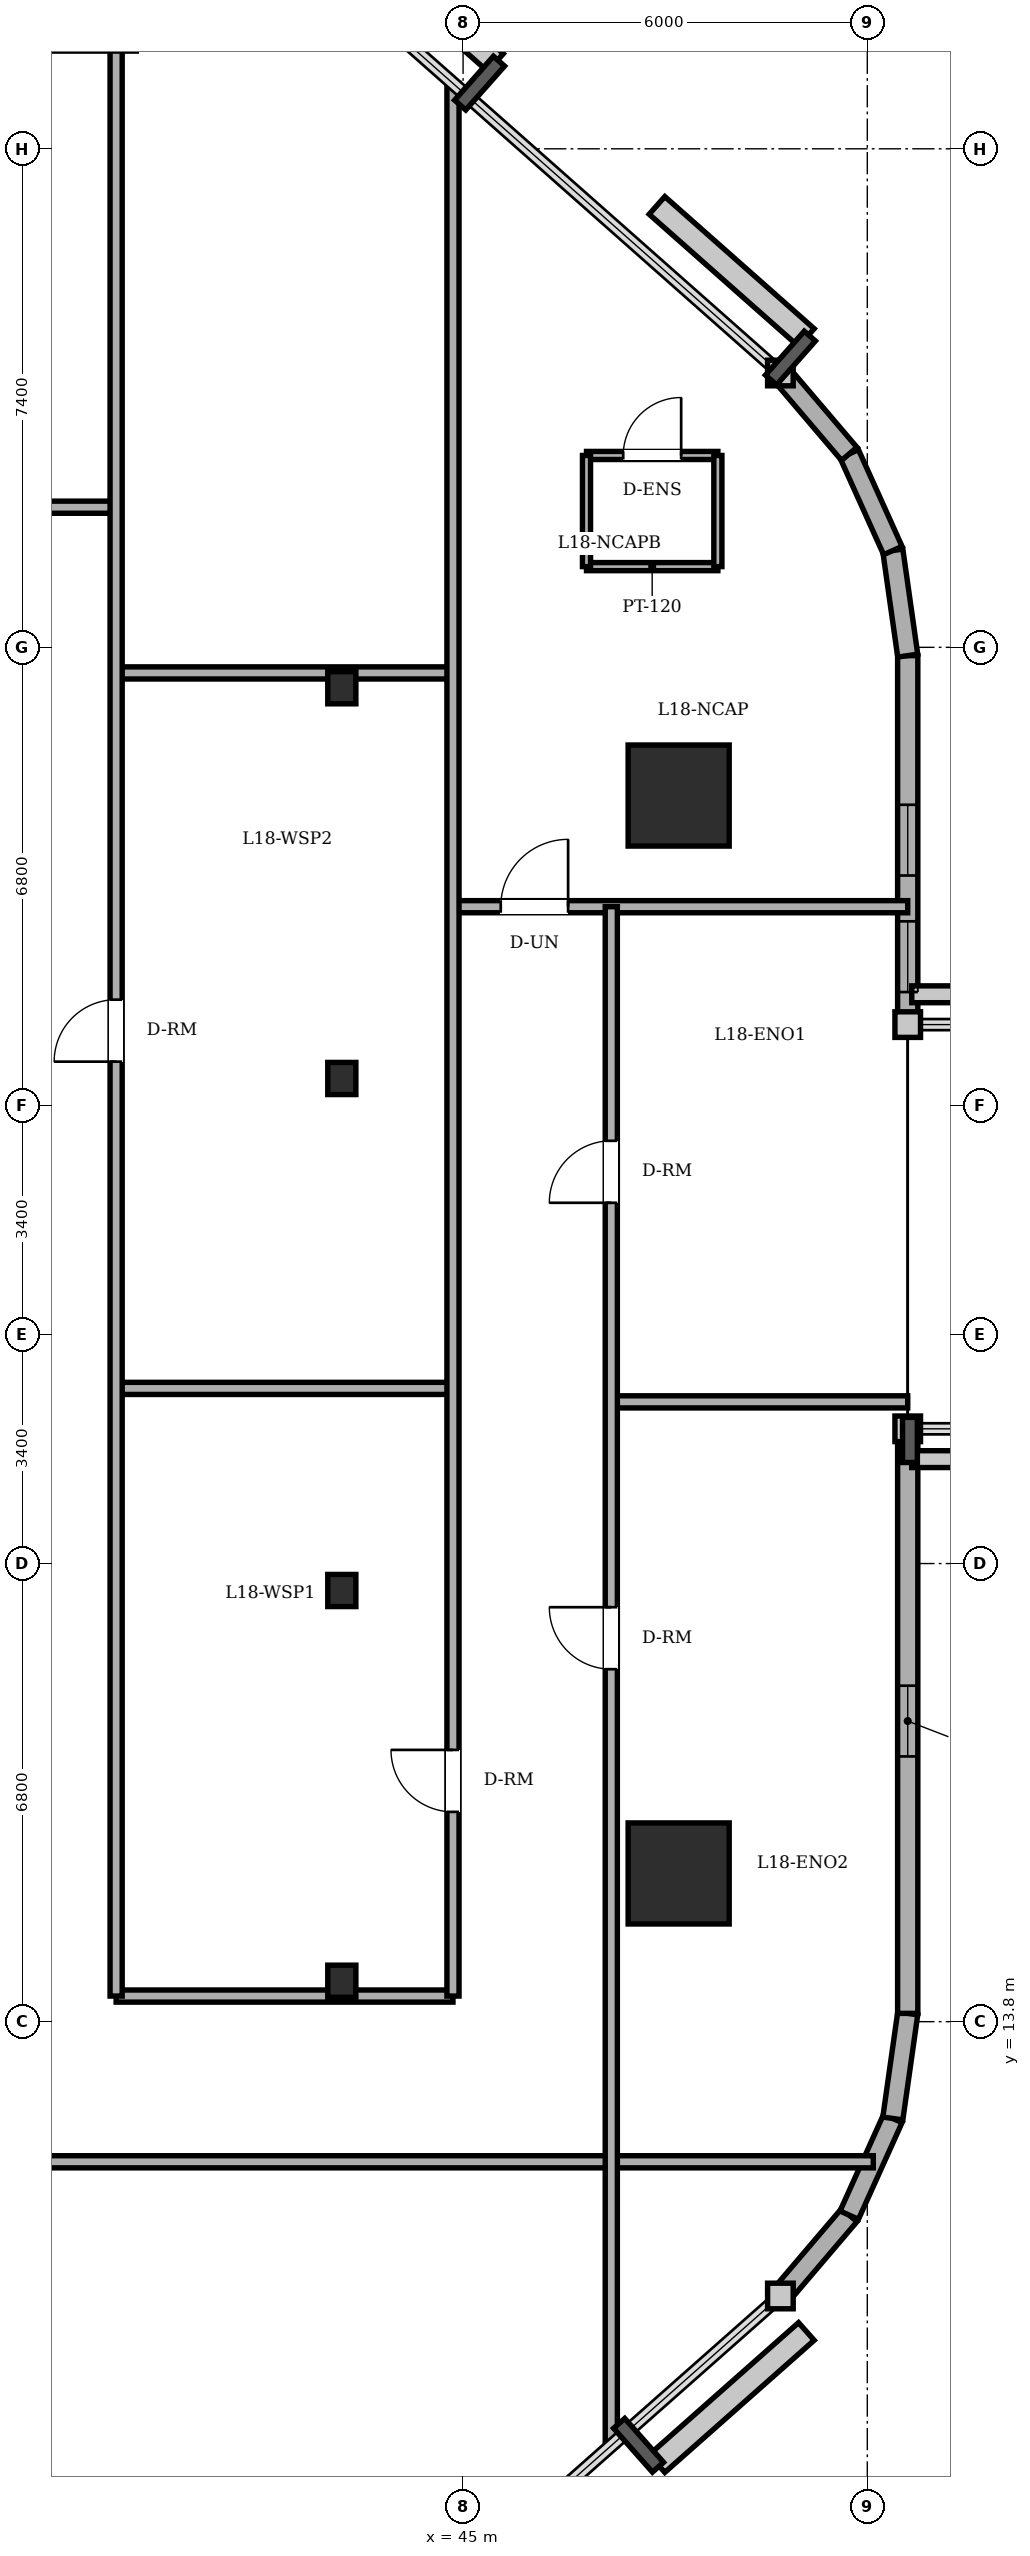
"""IFC4 building model, lengths in metres.
Left out: names, types, materials, properties, quantities, classifications, styles, units other than length and angle.
Written with IfcOpenShell. Run it as: python <this file> out.ifc"""

import sys

from ifc_helpers import new_model, si_unit, direction, frame, frame_2d, origin, origin_2d, place, context, subcontext, project, spatial, rectangle, circle, i_section, extrude, element, fill, save


model = new_model("IFC4")
c1 = context("Model", 3, precision=1e-05, world=origin(), true_north=direction((0.0, 1.0)))
c2 = subcontext(c1, "Body", "Model", "MODEL_VIEW")
j1 = project(units=[si_unit("LENGTHUNIT", "METRE"), si_unit("PLANEANGLEUNIT", "RADIAN")], contexts=[c1])
p1 = place(None, origin())
s1 = spatial("IfcSite", under=j1, at=p1, CompositionType="ELEMENT")
p2 = place(p1, origin())
s2 = spatial("IfcBuilding", under=s1, at=p2, CompositionType="ELEMENT")
p3 = place(p2, frame((0.0, 0.0, 68.4)))
s3 = spatial("IfcBuildingStorey", under=s2, at=p3, CompositionType="ELEMENT", Elevation=68.4)
for number, where, z_axis, x_axis in (
    (1, (48.2, 16.0, 0.0), (0.0, 0.0, 1.0), (1.0, 0.0, 0.0)),
    (2, (48.2, 32.0, 0.0), (0.0, 0.0, 1.0), (1.0, 0.0, 0.0)),
):
    element("IfcColumn", number, at=place(p3, frame(where, z_axis=z_axis, x_axis=x_axis)), inside=s3, PredefinedType="COLUMN", context=c2, shape_type="SweptSolid", body=[
        extrude(circle(Radius=0.75, at=origin_2d()), origin(), (0.0, 0.0, 1.0), 3.6),
    ])
for number, where, z_axis, x_axis in (
    (3, (43.2, 14.4, 0.0), (0.0, 0.0, 1.0), (1.0, 0.0, 0.0)),
    (4, (43.2, 20.2, 0.0), (0.0, 0.0, 1.0), (1.0, 0.0, 0.0)),
    (5, (43.2, 27.8, 0.0), (0.0, 0.0, 1.0), (1.0, 0.0, 0.0)),
    (6, (43.2, 33.6, 0.0), (0.0, 0.0, 1.0), (1.0, 0.0, 0.0)),
):
    element("IfcColumn", number, at=place(p3, frame(where, z_axis=z_axis, x_axis=x_axis)), inside=s3, PredefinedType="COLUMN", context=c2, shape_type="SweptSolid", body=[
        extrude(i_section(OverallWidth=0.417, OverallDepth=0.477, WebThickness=0.036, FlangeThickness=0.057, FilletRadius=0.015, at=origin_2d()), origin(), (0.0, 0.0, 1.0), 3.6),
    ])
p4 = place(p3, frame((49.71, 9.728, 0.0), z_axis=(0.0, 0.0, 1.0), x_axis=(0.648389989909, 0.7613083613, 0.0)))
e7 = element("IfcWall", 7, at=p4, inside=s3, PredefinedType="SOLIDWALL", context=c2, shape_type="SweptSolid", body=[
    extrude(rectangle(XDim=1.576, YDim=0.3, at=frame_2d((0.788, 0.0))), origin(), (0.0, 0.0, 1.0), 3.4),
])
p5 = place(p3, frame((50.732, 10.928, 0.0), z_axis=(0.0, 0.0, 1.0), x_axis=(0.410996558744, 0.911636895206, 0.0)))
e8 = element("IfcWall", 8, at=p5, inside=s3, PredefinedType="SOLIDWALL", context=c2, shape_type="SweptSolid", body=[
    extrude(rectangle(XDim=1.574, YDim=0.3, at=frame_2d((0.787, 0.0))), origin(), (0.0, 0.0, 1.0), 3.4),
])
p6 = place(p3, frame((51.379, 12.363, 0.0), z_axis=(0.0, 0.0, 1.0), x_axis=(0.140380048512, 0.990097693149, 0.0)))
e9 = element("IfcWall", 9, at=p6, inside=s3, PredefinedType="SOLIDWALL", context=c2, shape_type="SweptSolid", body=[
    extrude(rectangle(XDim=1.576, YDim=0.3, at=frame_2d((0.788, 0.0))), origin(), (0.0, 0.0, 1.0), 3.4),
])
p7 = place(p3, frame((51.6, 13.923, 0.0), z_axis=(0.0, 0.0, 1.0), x_axis=(0.0, 1.0, 0.0)))
e10 = element("IfcWall", 10, at=p7, inside=s3, PredefinedType="SOLIDWALL", context=c2, shape_type="SweptSolid", body=[
    extrude(rectangle(XDim=8.677, YDim=0.3, at=frame_2d((4.338, 0.0))), origin(), (0.0, 0.0, 1.0), 3.4),
])
p8 = place(p7, frame((3.814, 0.0, 0.85)))
e11 = element("IfcOpeningElement", 11, at=p8, cuts=e10, PredefinedType="OPENING", context=c2, shape_type="SweptSolid", body=[
    extrude(rectangle(XDim=1.05, YDim=1.55, at=frame_2d((0.525, 0.775))), frame((0.0, 0.16, 0.0), z_axis=(0.0, -1.0, 0.0), x_axis=(1.0, 0.0, 0.0)), (0.0, 0.0, 1.0), 0.32),
])
p9 = place(p3, frame((51.6, 28.6, 0.0), z_axis=(0.0, 0.0, 1.0), x_axis=(0.0, 1.0, 0.0)))
e12 = element("IfcWall", 12, at=p9, inside=s3, PredefinedType="SOLIDWALL", context=c2, shape_type="SweptSolid", body=[
    extrude(rectangle(XDim=5.477, YDim=0.3, at=frame_2d((2.738, 0.0))), origin(), (0.0, 0.0, 1.0), 3.4),
])
p10 = place(p9, frame((2.213, 0.0, 0.85)))
e13 = element("IfcOpeningElement", 13, at=p10, cuts=e12, PredefinedType="OPENING", context=c2, shape_type="SweptSolid", body=[
    extrude(rectangle(XDim=1.05, YDim=1.55, at=frame_2d((0.525, 0.775))), frame((0.0, 0.16, 0.0), z_axis=(0.0, -1.0, 0.0), x_axis=(1.0, 0.0, 0.0)), (0.0, 0.0, 1.0), 0.32),
])
p11 = place(p9, frame((0.483, 0.0, 0.85)))
e14 = element("IfcOpeningElement", 14, at=p11, cuts=e12, PredefinedType="OPENING", context=c2, shape_type="SweptSolid", body=[
    extrude(rectangle(XDim=1.05, YDim=1.55, at=frame_2d((0.525, 0.775))), frame((0.0, 0.16, 0.0), z_axis=(0.0, -1.0, 0.0), x_axis=(1.0, 0.0, 0.0)), (0.0, 0.0, 1.0), 0.32),
])
p12 = place(p3, frame((51.6, 34.077, 0.0), z_axis=(0.0, 0.0, 1.0), x_axis=(-0.140380048512, 0.990097693149, 0.0)))
e15 = element("IfcWall", 15, at=p12, inside=s3, PredefinedType="SOLIDWALL", context=c2, shape_type="SweptSolid", body=[
    extrude(rectangle(XDim=1.576, YDim=0.3, at=frame_2d((0.788, 0.0))), origin(), (0.0, 0.0, 1.0), 3.4),
])
p13 = place(p3, frame((51.379, 35.637, 0.0), z_axis=(0.0, 0.0, 1.0), x_axis=(-0.410996558744, 0.911636895206, 0.0)))
e16 = element("IfcWall", 16, at=p13, inside=s3, PredefinedType="SOLIDWALL", context=c2, shape_type="SweptSolid", body=[
    extrude(rectangle(XDim=1.574, YDim=0.3, at=frame_2d((0.787, 0.0))), origin(), (0.0, 0.0, 1.0), 3.4),
])
p14 = place(p3, frame((50.732, 37.072, 0.0), z_axis=(0.0, 0.0, 1.0), x_axis=(-0.648389989909, 0.7613083613, 0.0)))
e17 = element("IfcWall", 17, at=p14, inside=s3, PredefinedType="SOLIDWALL", context=c2, shape_type="SweptSolid", body=[
    extrude(rectangle(XDim=1.576, YDim=0.3, at=frame_2d((0.788, 0.0))), origin(), (0.0, 0.0, 1.0), 3.4),
])
p15 = place(p3, frame((46.832, 37.048, 0.0), z_axis=(0.0, 0.0, 1.0), x_axis=(1.0, 0.0, 0.0)))
e18 = element("IfcWall", 18, at=p15, inside=s3, PredefinedType="PARTITIONING", context=c2, shape_type="SweptSolid", body=[
    extrude(rectangle(XDim=1.95, YDim=0.12, at=frame_2d((0.975, 0.0))), origin(), (0.0, 0.0, 1.0), 3.4),
])
p16 = place(p15, frame((0.545, 0.0, 0.0)))
e19 = element("IfcOpeningElement", 19, at=p16, cuts=e18, PredefinedType="OPENING", context=c2, shape_type="SweptSolid", body=[
    extrude(rectangle(XDim=0.86, YDim=2.1, at=frame_2d((0.43, 1.05))), frame((0.0, 0.07, 0.0), z_axis=(0.0, -1.0, 0.0), x_axis=(1.0, 0.0, 0.0)), (0.0, 0.0, 1.0), 0.14),
])
p17 = place(p3, frame((48.782, 35.398, 0.0), z_axis=(0.0, 0.0, 1.0), x_axis=(-1.0, 0.0, 0.0)))
e20 = element("IfcWall", 20, at=p17, inside=s3, PredefinedType="PARTITIONING", context=c2, shape_type="SweptSolid", body=[
    extrude(rectangle(XDim=1.95, YDim=0.12, at=frame_2d((0.975, 0.0))), origin(), (0.0, 0.0, 1.0), 3.4),
])
for number, where, z_axis, x_axis in (
    (21, (46.832, 37.048, 0.0), (0.0, 0.0, 1.0), (0.0, -1.0, 0.0)),
    (22, (48.782, 35.398, 0.0), (0.0, 0.0, 1.0), (0.0, 1.0, 0.0)),
):
    element("IfcWall", number, at=place(p3, frame(where, z_axis=z_axis, x_axis=x_axis)), inside=s3, PredefinedType="PARTITIONING", context=c2, shape_type="SweptSolid", body=[
        extrude(rectangle(XDim=1.65, YDim=0.12, at=frame_2d((0.825, 0.0))), origin(), (0.0, 0.0, 1.0), 3.4),
    ])
p18 = place(p3, frame((3.4, 11.72, 0.0), z_axis=(0.0, 0.0, 1.0), x_axis=(1.0, 0.0, 0.0)))
e23 = element("IfcWall", 23, at=p18, inside=s3, PredefinedType="PARTITIONING", context=c2, shape_type="SweptSolid", body=[
    extrude(rectangle(XDim=47.689, YDim=0.18, at=frame_2d((23.845, 0.0))), origin(), (0.0, 0.0, 1.0), 3.4),
])
p19 = place(p18, frame((21.24, 0.0, 0.0)))
e24 = element("IfcOpeningElement", 24, at=p19, cuts=e23, PredefinedType="OPENING", context=c2, shape_type="SweptSolid", body=[
    extrude(rectangle(XDim=0.92, YDim=2.1, at=frame_2d((0.46, 1.05))), frame((0.0, 0.1, 0.0), z_axis=(0.0, -1.0, 0.0), x_axis=(1.0, 0.0, 0.0)), (0.0, 0.0, 1.0), 0.2),
])
p20 = place(p18, frame((10.74, 0.0, 0.0)))
e25 = element("IfcOpeningElement", 25, at=p20, cuts=e23, PredefinedType="OPENING", context=c2, shape_type="SweptSolid", body=[
    extrude(rectangle(XDim=0.92, YDim=2.1, at=frame_2d((0.46, 1.05))), frame((0.0, 0.1, 0.0), z_axis=(0.0, -1.0, 0.0), x_axis=(1.0, 0.0, 0.0)), (0.0, 0.0, 1.0), 0.2),
])
p21 = place(p18, frame((33.2, 0.0, 0.0)))
e26 = element("IfcOpeningElement", 26, at=p21, cuts=e23, PredefinedType="OPENING", context=c2, shape_type="SweptSolid", body=[
    extrude(rectangle(XDim=1.0, YDim=2.15, at=frame_2d((0.5, 1.075))), frame((0.0, 0.1, 0.0), z_axis=(0.0, -1.0, 0.0), x_axis=(1.0, 0.0, 0.0)), (0.0, 0.0, 1.0), 0.2),
])
p22 = place(p3, frame((39.85, 14.18, 0.0), z_axis=(0.0, 0.0, 1.0), x_axis=(1.0, 0.0, 0.0)))
e27 = element("IfcWall", 27, at=p22, inside=s3, PredefinedType="PARTITIONING", context=c2, shape_type="SweptSolid", body=[
    extrude(rectangle(XDim=5.0, YDim=0.18, at=frame_2d((2.5, 0.0))), origin(), (0.0, 0.0, 1.0), 2.782),
])
p23 = place(p3, frame((47.2, 23.0, 0.0), z_axis=(0.0, 0.0, 1.0), x_axis=(1.0, 0.0, 0.0)))
e28 = element("IfcWall", 28, at=p23, inside=s3, PredefinedType="PARTITIONING", context=c2, shape_type="SweptSolid", body=[
    extrude(rectangle(XDim=4.4, YDim=0.18, at=frame_2d((2.2, 0.0))), origin(), (0.0, 0.0, 1.0), 3.4),
])
p24 = place(p3, frame((39.85, 23.2, 0.0), z_axis=(0.0, 0.0, 1.0), x_axis=(1.0, 0.0, 0.0)))
e29 = element("IfcWall", 29, at=p24, inside=s3, PredefinedType="PARTITIONING", context=c2, shape_type="SweptSolid", body=[
    extrude(rectangle(XDim=5.0, YDim=0.18, at=frame_2d((2.5, 0.0))), origin(), (0.0, 0.0, 1.0), 3.4),
])
p25 = place(p3, frame((44.85, 30.35, 0.0), z_axis=(0.0, 0.0, 1.0), x_axis=(1.0, 0.0, 0.0)))
e30 = element("IfcWall", 30, at=p25, inside=s3, PredefinedType="PARTITIONING", context=c2, shape_type="SweptSolid", body=[
    extrude(rectangle(XDim=6.75, YDim=0.18, at=frame_2d((3.375, 0.0))), origin(), (0.0, 0.0, 1.0), 3.4),
])
p26 = place(p25, frame((0.709, 0.0, 0.0)))
e31 = element("IfcOpeningElement", 31, at=p26, cuts=e30, PredefinedType="OPENING", context=c2, shape_type="SweptSolid", body=[
    extrude(rectangle(XDim=1.0, YDim=2.15, at=frame_2d((0.5, 1.075))), frame((0.0, 0.1, 0.0), z_axis=(0.0, -1.0, 0.0), x_axis=(1.0, 0.0, 0.0)), (0.0, 0.0, 1.0), 0.2),
])
p27 = place(p3, frame((39.85, 33.82, 0.0), z_axis=(0.0, 0.0, 1.0), x_axis=(1.0, 0.0, 0.0)))
e32 = element("IfcWall", 32, at=p27, inside=s3, PredefinedType="PARTITIONING", context=c2, shape_type="SweptSolid", body=[
    extrude(rectangle(XDim=5.0, YDim=0.18, at=frame_2d((2.5, 0.0))), origin(), (0.0, 0.0, 1.0), 2.782),
])
p28 = place(p3, frame((3.4, 36.28, 0.0), z_axis=(0.0, 0.0, 1.0), x_axis=(1.0, 0.0, 0.0)))
e33 = element("IfcWall", 33, at=p28, inside=s3, PredefinedType="PARTITIONING", context=c2, shape_type="SweptSolid", body=[
    extrude(rectangle(XDim=36.45, YDim=0.18, at=frame_2d((18.225, 0.0))), origin(), (0.0, 0.0, 1.0), 3.4),
])
p29 = place(p28, frame((21.05, 0.0, 0.0)))
e34 = element("IfcOpeningElement", 34, at=p29, cuts=e33, PredefinedType="OPENING", context=c2, shape_type="SweptSolid", body=[
    extrude(rectangle(XDim=0.9, YDim=2.1, at=frame_2d((0.45, 1.05))), frame((0.0, 0.1, 0.0), z_axis=(0.0, -1.0, 0.0), x_axis=(1.0, 0.0, 0.0)), (0.0, 0.0, 1.0), 0.2),
])
p30 = place(p28, frame((24.67, 0.0, 0.0)))
e35 = element("IfcOpeningElement", 35, at=p30, cuts=e33, PredefinedType="OPENING", context=c2, shape_type="SweptSolid", body=[
    extrude(rectangle(XDim=0.86, YDim=2.1, at=frame_2d((0.43, 1.05))), frame((0.0, 0.1, 0.0), z_axis=(0.0, -1.0, 0.0), x_axis=(1.0, 0.0, 0.0)), (0.0, 0.0, 1.0), 0.2),
])
p31 = place(p28, frame((10.74, 0.0, 0.0)))
e36 = element("IfcOpeningElement", 36, at=p31, cuts=e33, PredefinedType="OPENING", context=c2, shape_type="SweptSolid", body=[
    extrude(rectangle(XDim=0.92, YDim=2.1, at=frame_2d((0.46, 1.05))), frame((0.0, 0.1, 0.0), z_axis=(0.0, -1.0, 0.0), x_axis=(1.0, 0.0, 0.0)), (0.0, 0.0, 1.0), 0.2),
])
p32 = place(p28, frame((31.005, 0.0, 0.0)))
e37 = element("IfcOpeningElement", 37, at=p32, cuts=e33, PredefinedType="OPENING", context=c2, shape_type="SweptSolid", body=[
    extrude(rectangle(XDim=0.92, YDim=2.1, at=frame_2d((0.46, 1.05))), frame((0.0, 0.1, 0.0), z_axis=(0.0, -1.0, 0.0), x_axis=(1.0, 0.0, 0.0)), (0.0, 0.0, 1.0), 0.2),
])
p33 = place(p3, frame((39.85, 14.18, 0.0), z_axis=(0.0, 0.0, 1.0), x_axis=(0.0, 1.0, 0.0)))
e38 = element("IfcWall", 38, at=p33, inside=s3, PredefinedType="PARTITIONING", context=c2, shape_type="SweptSolid", body=[
    extrude(rectangle(XDim=31.527, YDim=0.18, at=frame_2d((15.764, 0.0))), origin(), (0.0, 0.0, 1.0), 2.782),
])
p34 = place(p33, frame((13.87, 0.0, 0.0)))
e39 = element("IfcOpeningElement", 39, at=p34, cuts=e38, PredefinedType="OPENING", context=c2, shape_type="SweptSolid", body=[
    extrude(rectangle(XDim=0.92, YDim=2.1, at=frame_2d((0.46, 1.05))), frame((0.0, 0.1, 0.0), z_axis=(0.0, -1.0, 0.0), x_axis=(1.0, 0.0, 0.0)), (0.0, 0.0, 1.0), 0.2),
])
p35 = place(p3, frame((44.85, 14.18, 0.0), z_axis=(0.0, 0.0, 1.0), x_axis=(0.0, 1.0, 0.0)))
e40 = element("IfcWall", 40, at=p35, inside=s3, PredefinedType="PARTITIONING", context=c2, shape_type="SweptSolid", body=[
    extrude(rectangle(XDim=28.391, YDim=0.18, at=frame_2d((14.196, 0.0))), origin(), (0.0, 0.0, 1.0), 3.4),
])
p36 = place(p35, frame((2.734, 0.0, 0.0)))
e41 = element("IfcOpeningElement", 41, at=p36, cuts=e40, PredefinedType="OPENING", context=c2, shape_type="SweptSolid", body=[
    extrude(rectangle(XDim=0.92, YDim=2.1, at=frame_2d((0.46, 1.05))), frame((0.0, 0.1, 0.0), z_axis=(0.0, -1.0, 0.0), x_axis=(1.0, 0.0, 0.0)), (0.0, 0.0, 1.0), 0.2),
])
p37 = place(p3, frame((47.2, 7.508, 0.0), z_axis=(0.0, 0.0, 1.0), x_axis=(0.0, 1.0, 0.0)))
e42 = element("IfcWall", 42, at=p37, inside=s3, PredefinedType="PARTITIONING", context=c2, shape_type="SweptSolid", body=[
    extrude(rectangle(XDim=22.842, YDim=0.18, at=frame_2d((11.421, 0.0))), origin(), (0.0, 0.0, 1.0), 3.4),
])
p38 = place(p37, frame((18.447, 0.0, 0.0)))
e43 = element("IfcOpeningElement", 43, at=p38, cuts=e42, PredefinedType="OPENING", context=c2, shape_type="SweptSolid", body=[
    extrude(rectangle(XDim=0.92, YDim=2.1, at=frame_2d((0.46, 1.05))), frame((0.0, 0.1, 0.0), z_axis=(0.0, -1.0, 0.0), x_axis=(1.0, 0.0, 0.0)), (0.0, 0.0, 1.0), 0.2),
])
p39 = place(p37, frame((11.524, 0.0, 0.0)))
e44 = element("IfcOpeningElement", 44, at=p39, cuts=e42, PredefinedType="OPENING", context=c2, shape_type="SweptSolid", body=[
    extrude(rectangle(XDim=0.92, YDim=2.1, at=frame_2d((0.46, 1.05))), frame((0.0, 0.1, 0.0), z_axis=(0.0, -1.0, 0.0), x_axis=(1.0, 0.0, 0.0)), (0.0, 0.0, 1.0), 0.2),
])
p40 = place(p8, origin())
e45 = element("IfcWindow", 45, at=p40, inside=s3, PartitioningType="SINGLE_PANEL", PredefinedType="WINDOW", context=c2, shape_type="SweptSolid", body=[
    extrude(rectangle(XDim=1.05, YDim=1.55, at=frame_2d((0.525, 0.775))), frame((0.0, 0.03, 0.0), z_axis=(0.0, -1.0, 0.0), x_axis=(1.0, 0.0, 0.0)), (0.0, 0.0, 1.0), 0.06),
])
fill(e11, e45)
p41 = place(p10, origin())
e46 = element("IfcWindow", 46, at=p41, inside=s3, PartitioningType="SINGLE_PANEL", PredefinedType="WINDOW", context=c2, shape_type="SweptSolid", body=[
    extrude(rectangle(XDim=1.05, YDim=1.55, at=frame_2d((0.525, 0.775))), frame((0.0, 0.03, 0.0), z_axis=(0.0, -1.0, 0.0), x_axis=(1.0, 0.0, 0.0)), (0.0, 0.0, 1.0), 0.06),
])
fill(e13, e46)
p42 = place(p11, origin())
e47 = element("IfcWindow", 47, at=p42, inside=s3, PartitioningType="SINGLE_PANEL", PredefinedType="WINDOW", context=c2, shape_type="SweptSolid", body=[
    extrude(rectangle(XDim=1.05, YDim=1.55, at=frame_2d((0.525, 0.775))), frame((0.0, 0.03, 0.0), z_axis=(0.0, -1.0, 0.0), x_axis=(1.0, 0.0, 0.0)), (0.0, 0.0, 1.0), 0.06),
])
fill(e14, e47)
p43 = place(p16, origin())
e48 = element("IfcDoor", 48, at=p43, inside=s3, OperationType="SINGLE_SWING_RIGHT", PredefinedType="DOOR", context=c2, shape_type="SweptSolid", body=[
    extrude(rectangle(XDim=0.86, YDim=2.1, at=frame_2d((0.43, 1.05))), frame((0.0, 0.025, 0.0), z_axis=(0.0, -1.0, 0.0), x_axis=(1.0, 0.0, 0.0)), (0.0, 0.0, 1.0), 0.05),
])
fill(e19, e48)
p44 = place(p36, origin())
e49 = element("IfcDoor", 49, at=p44, inside=s3, OperationType="SINGLE_SWING_RIGHT", PredefinedType="DOOR", context=c2, shape_type="SweptSolid", body=[
    extrude(rectangle(XDim=0.92, YDim=2.1, at=frame_2d((0.46, 1.05))), frame((0.0, 0.025, 0.0), z_axis=(0.0, -1.0, 0.0), x_axis=(1.0, 0.0, 0.0)), (0.0, 0.0, 1.0), 0.05),
])
fill(e41, e49)
p45 = place(p34, origin())
e50 = element("IfcDoor", 50, at=p45, inside=s3, OperationType="SINGLE_SWING_LEFT", PredefinedType="DOOR", context=c2, shape_type="SweptSolid", body=[
    extrude(rectangle(XDim=0.92, YDim=2.1, at=frame_2d((0.46, 1.05))), frame((0.0, 0.025, 0.0), z_axis=(0.0, -1.0, 0.0), x_axis=(1.0, 0.0, 0.0)), (0.0, 0.0, 1.0), 0.05),
])
fill(e39, e50)
p46 = place(p26, origin())
e51 = element("IfcDoor", 51, at=p46, inside=s3, OperationType="SINGLE_SWING_RIGHT", PredefinedType="DOOR", context=c2, shape_type="SweptSolid", body=[
    extrude(rectangle(XDim=1.0, YDim=2.15, at=frame_2d((0.5, 1.075))), frame((0.0, 0.025, 0.0), z_axis=(0.0, -1.0, 0.0), x_axis=(1.0, 0.0, 0.0)), (0.0, 0.0, 1.0), 0.05),
])
fill(e31, e51)
p47 = place(p38, origin())
e52 = element("IfcDoor", 52, at=p47, inside=s3, OperationType="SINGLE_SWING_LEFT", PredefinedType="DOOR", context=c2, shape_type="SweptSolid", body=[
    extrude(rectangle(XDim=0.92, YDim=2.1, at=frame_2d((0.46, 1.05))), frame((0.0, 0.025, 0.0), z_axis=(0.0, -1.0, 0.0), x_axis=(1.0, 0.0, 0.0)), (0.0, 0.0, 1.0), 0.05),
])
fill(e43, e52)
p48 = place(p39, origin())
e53 = element("IfcDoor", 53, at=p48, inside=s3, OperationType="SINGLE_SWING_RIGHT", PredefinedType="DOOR", context=c2, shape_type="SweptSolid", body=[
    extrude(rectangle(XDim=0.92, YDim=2.1, at=frame_2d((0.46, 1.05))), frame((0.0, 0.025, 0.0), z_axis=(0.0, -1.0, 0.0), x_axis=(1.0, 0.0, 0.0)), (0.0, 0.0, 1.0), 0.05),
])
fill(e44, e53)
save(model, sys.argv[1])
